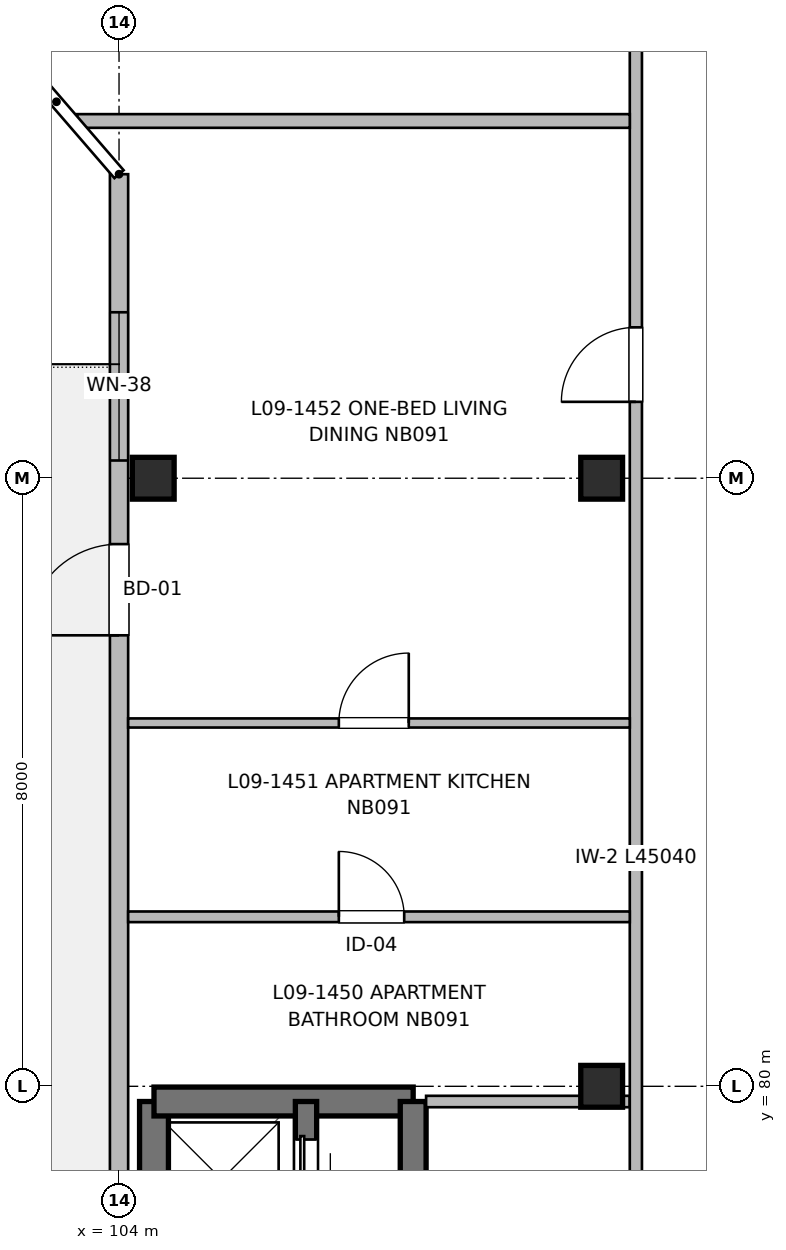
"""IFC4 building model, lengths in metres.
Left out: names, types, materials, properties, quantities, classifications, styles, units other than length and angle.
Written with IfcOpenShell. Run it as: python <this file> out.ifc"""

import sys

from ifc_helpers import new_model, si_unit, direction, frame, frame_2d, origin, origin_2d, place, context, subcontext, project, spatial, rectangle, extrude, element, fill, save


model = new_model("IFC4")
c1 = context("Model", 3, precision=1e-05, world=origin(), true_north=direction((0.0, 1.0)))
c2 = subcontext(c1, "Body", "Model", "MODEL_VIEW")
j1 = project(units=[si_unit("LENGTHUNIT", "METRE"), si_unit("PLANEANGLEUNIT", "RADIAN")], contexts=[c1])
p1 = place(None, origin())
s1 = spatial("IfcSite", under=j1, at=p1, CompositionType="ELEMENT")
p2 = place(p1, origin())
s2 = spatial("IfcBuilding", under=s1, at=p2, CompositionType="ELEMENT")
p3 = place(p2, frame((0.0, 0.0, 29.76)))
s3 = spatial("IfcBuildingStorey", under=s2, at=p3, CompositionType="ELEMENT", Elevation=29.76)
for number, where, z_axis, x_axis in (
    (1, (104.45, 88.0, 0.0), (0.0, 0.0, 1.0), (1.0, 0.0, 0.0)),
    (2, (110.35, 80.0, 0.0), (0.0, 0.0, 1.0), (1.0, 0.0, 0.0)),
    (3, (110.35, 88.0, 0.0), (0.0, 0.0, 1.0), (1.0, 0.0, 0.0)),
):
    element("IfcColumn", number, at=place(p3, frame(where, z_axis=z_axis, x_axis=x_axis)), inside=s3, PredefinedType="COLUMN", context=c2, shape_type="SweptSolid", body=[
        extrude(rectangle(XDim=0.55, YDim=0.55, at=origin_2d()), origin(), (0.0, 0.0, 1.0), 3.2),
    ])
p4 = place(p3, frame((104.46, 67.35, 0.0), z_axis=(0.0, 0.0, 1.0), x_axis=(0.0, 1.0, 0.0)))
e4 = element("IfcWall", 4, at=p4, inside=s3, PredefinedType="SHEAR", context=c2, shape_type="SweptSolid", body=[
    extrude(rectangle(XDim=12.45, YDim=0.38, at=frame_2d((6.225, 0.0))), origin(), (0.0, 0.0, 1.0), 3.2),
])
p5 = place(p4, frame((2.2, 0.0, 0.97)))
e5 = element("IfcOpeningElement", 5, at=p5, cuts=e4, PredefinedType="OPENING", context=c2, shape_type="SweptSolid", body=[
    extrude(rectangle(XDim=0.95, YDim=1.25, at=frame_2d((0.475, 0.625))), frame((0.0, 0.2, 0.0), z_axis=(0.0, -1.0, 0.0), x_axis=(1.0, 0.0, 0.0)), (0.0, 0.0, 1.0), 0.4),
])
p6 = place(p3, frame((104.46, 79.8, 0.0), z_axis=(0.0, 0.0, 1.0), x_axis=(1.0, 0.0, 0.0)))
e6 = element("IfcWall", 6, at=p6, inside=s3, PredefinedType="SHEAR", context=c2, shape_type="SweptSolid", body=[
    extrude(rectangle(XDim=3.41, YDim=0.38, at=frame_2d((1.705, 0.0))), origin(), (0.0, 0.0, 1.0), 3.2),
])
p7 = place(p3, frame((107.87, 79.8, 0.0), z_axis=(0.0, 0.0, 1.0), x_axis=(0.0, -1.0, 0.0)))
e7 = element("IfcWall", 7, at=p7, inside=s3, PredefinedType="SHEAR", context=c2, shape_type="SweptSolid", body=[
    extrude(rectangle(XDim=12.45, YDim=0.34, at=frame_2d((6.225, 0.0))), origin(), (0.0, 0.0, 1.0), 3.2),
])
p8 = place(p7, frame((10.85, 0.0, 0.0)))
e8 = element("IfcOpeningElement", 8, at=p8, cuts=e7, PredefinedType="OPENING", context=c2, shape_type="SweptSolid", body=[
    extrude(rectangle(XDim=1.05, YDim=2.15, at=frame_2d((0.525, 1.075))), frame((0.0, 0.18, 0.0), z_axis=(0.0, -1.0, 0.0), x_axis=(1.0, 0.0, 0.0)), (0.0, 0.0, 1.0), 0.36),
])
p9 = place(p3, frame((106.46, 74.55, 0.0), z_axis=(0.0, 0.0, 1.0), x_axis=(0.0, 1.0, 0.0)))
e9 = element("IfcWall", 9, at=p9, inside=s3, PredefinedType="SHEAR", context=c2, shape_type="SweptSolid", body=[
    extrude(rectangle(XDim=5.25, YDim=0.28, at=frame_2d((2.625, 0.0))), origin(), (0.0, 0.0, 1.0), 3.2),
])
p10 = place(p9, frame((1.15, 0.0, 0.0)))
e10 = element("IfcOpeningElement", 10, at=p10, cuts=e9, PredefinedType="OPENING", context=c2, shape_type="SweptSolid", body=[
    extrude(rectangle(XDim=1.0, YDim=2.15, at=frame_2d((0.5, 1.075))), frame((0.0, 0.15, 0.0), z_axis=(0.0, -1.0, 0.0), x_axis=(1.0, 0.0, 0.0)), (0.0, 0.0, 1.0), 0.3),
])
p11 = place(p9, frame((3.85, 0.0, 0.0)))
e11 = element("IfcOpeningElement", 11, at=p11, cuts=e9, PredefinedType="OPENING", context=c2, shape_type="SweptSolid", body=[
    extrude(rectangle(XDim=0.9, YDim=2.15, at=frame_2d((0.45, 1.075))), frame((0.0, 0.15, 0.0), z_axis=(0.0, -1.0, 0.0), x_axis=(1.0, 0.0, 0.0)), (0.0, 0.0, 1.0), 0.3),
])
p12 = place(p3, frame((104.0, 61.6, 0.0), z_axis=(0.0, 0.0, 1.0), x_axis=(0.0, 1.0, 0.0)))
e12 = element("IfcWall", 12, at=p12, inside=s3, PredefinedType="SOLIDWALL", context=c2, shape_type="SweptSolid", body=[
    extrude(rectangle(XDim=30.4, YDim=0.24, at=frame_2d((15.2, 0.0))), origin(), (0.0, 0.0, 1.0), 2.98),
])
p13 = place(p12, frame((3.467, 0.0, 0.82)))
e13 = element("IfcOpeningElement", 13, at=p13, cuts=e12, PredefinedType="OPENING", context=c2, shape_type="SweptSolid", body=[
    extrude(rectangle(XDim=1.5, YDim=1.4, at=frame_2d((0.75, 0.7))), frame((0.0, 0.13, 0.0), z_axis=(0.0, -1.0, 0.0), x_axis=(1.0, 0.0, 0.0)), (0.0, 0.0, 1.0), 0.26),
])
p14 = place(p12, frame((14.425, 0.0, 0.82)))
e14 = element("IfcOpeningElement", 14, at=p14, cuts=e12, PredefinedType="OPENING", context=c2, shape_type="SweptSolid", body=[
    extrude(rectangle(XDim=1.55, YDim=1.4, at=frame_2d((0.775, 0.7))), frame((0.0, 0.13, 0.0), z_axis=(0.0, -1.0, 0.0), x_axis=(1.0, 0.0, 0.0)), (0.0, 0.0, 1.0), 0.26),
])
p15 = place(p12, frame((24.333, 0.0, 0.0)))
e15 = element("IfcOpeningElement", 15, at=p15, cuts=e12, PredefinedType="OPENING", context=c2, shape_type="SweptSolid", body=[
    extrude(rectangle(XDim=1.2, YDim=2.2, at=frame_2d((0.6, 1.1))), frame((0.0, 0.13, 0.0), z_axis=(0.0, -1.0, 0.0), x_axis=(1.0, 0.0, 0.0)), (0.0, 0.0, 1.0), 0.26),
])
p16 = place(p12, frame((26.633, 0.0, 0.72)))
e16 = element("IfcOpeningElement", 16, at=p16, cuts=e12, PredefinedType="OPENING", context=c2, shape_type="SweptSolid", body=[
    extrude(rectangle(XDim=1.95, YDim=1.5, at=frame_2d((0.975, 0.75))), frame((0.0, 0.13, 0.0), z_axis=(0.0, -1.0, 0.0), x_axis=(1.0, 0.0, 0.0)), (0.0, 0.0, 1.0), 0.26),
])
p17 = place(p3, frame((108.04, 79.8, 0.0), z_axis=(0.0, 0.0, 1.0), x_axis=(1.0, 0.0, 0.0)))
e17 = element("IfcWall", 17, at=p17, inside=s3, PredefinedType="PARTITIONING", context=c2, shape_type="SweptSolid", body=[
    extrude(rectangle(XDim=2.68, YDim=0.15, at=frame_2d((1.34, 0.0))), origin(), (0.0, 0.0, 1.0), 2.935),
])
p18 = place(p3, frame((110.8, 61.76, 0.0), z_axis=(0.0, 0.0, 1.0), x_axis=(0.0, 1.0, 0.0)))
e18 = element("IfcWall", 18, at=p18, inside=s3, PredefinedType="PARTITIONING", context=c2, shape_type="SweptSolid", body=[
    extrude(rectangle(XDim=45.04, YDim=0.16, at=frame_2d((22.52, 0.0))), origin(), (0.0, 0.0, 1.0), 2.935),
])
p19 = place(p18, frame((7.24, 0.0, 0.0)))
e19 = element("IfcOpeningElement", 19, at=p19, cuts=e18, PredefinedType="OPENING", context=c2, shape_type="SweptSolid", body=[
    extrude(rectangle(XDim=1.1, YDim=2.15, at=frame_2d((0.55, 1.075))), frame((0.0, 0.09, 0.0), z_axis=(0.0, -1.0, 0.0), x_axis=(1.0, 0.0, 0.0)), (0.0, 0.0, 1.0), 0.18),
])
p20 = place(p18, frame((13.64, 0.0, 0.0)))
e20 = element("IfcOpeningElement", 20, at=p20, cuts=e18, PredefinedType="OPENING", context=c2, shape_type="SweptSolid", body=[
    extrude(rectangle(XDim=1.6, YDim=2.15, at=frame_2d((0.8, 1.075))), frame((0.0, 0.09, 0.0), z_axis=(0.0, -1.0, 0.0), x_axis=(1.0, 0.0, 0.0)), (0.0, 0.0, 1.0), 0.18),
])
p21 = place(p18, frame((3.0, 0.0, 0.0)))
e21 = element("IfcOpeningElement", 21, at=p21, cuts=e18, PredefinedType="OPENING", context=c2, shape_type="SweptSolid", body=[
    extrude(rectangle(XDim=0.96, YDim=2.15, at=frame_2d((0.48, 1.075))), frame((0.0, 0.09, 0.0), z_axis=(0.0, -1.0, 0.0), x_axis=(1.0, 0.0, 0.0)), (0.0, 0.0, 1.0), 0.18),
])
p22 = place(p18, frame((27.245, 0.0, 0.0)))
e22 = element("IfcOpeningElement", 22, at=p22, cuts=e18, PredefinedType="OPENING", context=c2, shape_type="SweptSolid", body=[
    extrude(rectangle(XDim=0.98, YDim=2.15, at=frame_2d((0.49, 1.075))), frame((0.0, 0.09, 0.0), z_axis=(0.0, -1.0, 0.0), x_axis=(1.0, 0.0, 0.0)), (0.0, 0.0, 1.0), 0.18),
])
p23 = place(p18, frame((35.055, 0.0, 0.0)))
e23 = element("IfcOpeningElement", 23, at=p23, cuts=e18, PredefinedType="OPENING", context=c2, shape_type="SweptSolid", body=[
    extrude(rectangle(XDim=0.98, YDim=2.15, at=frame_2d((0.49, 1.075))), frame((0.0, 0.09, 0.0), z_axis=(0.0, -1.0, 0.0), x_axis=(1.0, 0.0, 0.0)), (0.0, 0.0, 1.0), 0.18),
])
p24 = place(p3, frame((103.448, 92.7, 0.0), z_axis=(0.0, 0.0, 1.0), x_axis=(1.0, 0.0, 0.0)))
e24 = element("IfcWall", 24, at=p24, inside=s3, PredefinedType="PARTITIONING", context=c2, shape_type="SweptSolid", body=[
    extrude(rectangle(XDim=7.272, YDim=0.18, at=frame_2d((3.636, 0.0))), origin(), (0.0, 0.0, 1.0), 2.935),
])
p25 = place(p3, frame((104.12, 82.23, 0.0), z_axis=(0.0, 0.0, 1.0), x_axis=(1.0, 0.0, 0.0)))
e25 = element("IfcWall", 25, at=p25, inside=s3, PredefinedType="PARTITIONING", context=c2, shape_type="SweptSolid", body=[
    extrude(rectangle(XDim=6.6, YDim=0.14, at=frame_2d((3.3, 0.0))), origin(), (0.0, 0.0, 1.0), 2.935),
])
p26 = place(p25, frame((2.772, 0.0, 0.0)))
e26 = element("IfcOpeningElement", 26, at=p26, cuts=e25, PredefinedType="OPENING", context=c2, shape_type="SweptSolid", body=[
    extrude(rectangle(XDim=0.86, YDim=2.1, at=frame_2d((0.43, 1.05))), frame((0.0, 0.08, 0.0), z_axis=(0.0, -1.0, 0.0), x_axis=(1.0, 0.0, 0.0)), (0.0, 0.0, 1.0), 0.16),
])
p27 = place(p3, frame((104.12, 84.78, 0.0), z_axis=(0.0, 0.0, 1.0), x_axis=(1.0, 0.0, 0.0)))
e27 = element("IfcWall", 27, at=p27, inside=s3, PredefinedType="PARTITIONING", context=c2, shape_type="SweptSolid", body=[
    extrude(rectangle(XDim=6.6, YDim=0.12, at=frame_2d((3.3, 0.0))), origin(), (0.0, 0.0, 1.0), 2.935),
])
p28 = place(p27, frame((2.772, 0.0, 0.0)))
e28 = element("IfcOpeningElement", 28, at=p28, cuts=e27, PredefinedType="OPENING", context=c2, shape_type="SweptSolid", body=[
    extrude(rectangle(XDim=0.92, YDim=2.1, at=frame_2d((0.46, 1.05))), frame((0.0, 0.07, 0.0), z_axis=(0.0, -1.0, 0.0), x_axis=(1.0, 0.0, 0.0)), (0.0, 0.0, 1.0), 0.14),
])
p29 = place(p11, origin())
e29 = element("IfcDoor", 29, at=p29, inside=s3, OperationType="SLIDING_TO_RIGHT", PredefinedType="DOOR", context=c2, shape_type="SweptSolid", body=[
    extrude(rectangle(XDim=0.9, YDim=2.15, at=frame_2d((0.45, 1.075))), frame((0.0, 0.025, 0.0), z_axis=(0.0, -1.0, 0.0), x_axis=(1.0, 0.0, 0.0)), (0.0, 0.0, 1.0), 0.05),
])
fill(e11, e29)
p30 = place(p15, origin())
e30 = element("IfcDoor", 30, at=p30, inside=s3, OperationType="SINGLE_SWING_LEFT", PredefinedType="DOOR", context=c2, shape_type="SweptSolid", body=[
    extrude(rectangle(XDim=1.2, YDim=2.2, at=frame_2d((0.6, 1.1))), frame((0.0, 0.025, 0.0), z_axis=(0.0, -1.0, 0.0), x_axis=(1.0, 0.0, 0.0)), (0.0, 0.0, 1.0), 0.05),
])
fill(e15, e30)
p31 = place(p16, origin())
e31 = element("IfcWindow", 31, at=p31, inside=s3, PartitioningType="SINGLE_PANEL", PredefinedType="WINDOW", context=c2, shape_type="SweptSolid", body=[
    extrude(rectangle(XDim=1.95, YDim=1.5, at=frame_2d((0.975, 0.75))), frame((0.0, 0.03, 0.0), z_axis=(0.0, -1.0, 0.0), x_axis=(1.0, 0.0, 0.0)), (0.0, 0.0, 1.0), 0.06),
])
fill(e16, e31)
p32 = place(p26, origin())
e32 = element("IfcDoor", 32, at=p32, inside=s3, OperationType="SINGLE_SWING_LEFT", PredefinedType="DOOR", context=c2, shape_type="SweptSolid", body=[
    extrude(rectangle(XDim=0.86, YDim=2.1, at=frame_2d((0.43, 1.05))), frame((0.0, 0.025, 0.0), z_axis=(0.0, -1.0, 0.0), x_axis=(1.0, 0.0, 0.0)), (0.0, 0.0, 1.0), 0.05),
])
fill(e26, e32)
p33 = place(p28, origin())
e33 = element("IfcDoor", 33, at=p33, inside=s3, OperationType="SINGLE_SWING_RIGHT", PredefinedType="DOOR", context=c2, shape_type="SweptSolid", body=[
    extrude(rectangle(XDim=0.92, YDim=2.1, at=frame_2d((0.46, 1.05))), frame((0.0, 0.025, 0.0), z_axis=(0.0, -1.0, 0.0), x_axis=(1.0, 0.0, 0.0)), (0.0, 0.0, 1.0), 0.05),
])
fill(e28, e33)
p34 = place(p22, origin())
e34 = element("IfcDoor", 34, at=p34, inside=s3, OperationType="SINGLE_SWING_LEFT", PredefinedType="DOOR", context=c2, shape_type="SweptSolid", body=[
    extrude(rectangle(XDim=0.98, YDim=2.15, at=frame_2d((0.49, 1.075))), frame((0.0, 0.025, 0.0), z_axis=(0.0, -1.0, 0.0), x_axis=(1.0, 0.0, 0.0)), (0.0, 0.0, 1.0), 0.05),
])
fill(e22, e34)
save(model, sys.argv[1])
